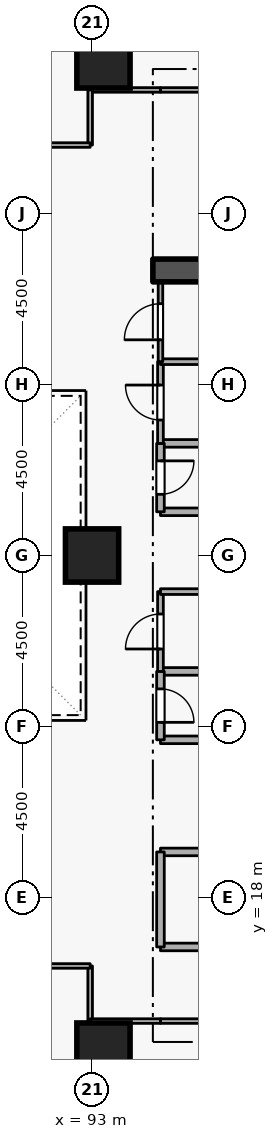
"""IFC4 building model, lengths in metres.
Left out: names, types, materials, properties, quantities, classifications, styles, units other than length and angle.
Written with IfcOpenShell. Run it as: python <this file> out.ifc"""

import sys

from ifc_helpers import new_model, si_unit, direction, frame, frame_2d, origin, origin_2d, place, context, subcontext, project, spatial, rectangle, extrude, element, fill, save


model = new_model("IFC4")
c1 = context("Model", 3, precision=1e-05, world=origin(), true_north=direction((0.0, 1.0)))
c2 = subcontext(c1, "Body", "Model", "MODEL_VIEW")
j1 = project(units=[si_unit("LENGTHUNIT", "METRE"), si_unit("PLANEANGLEUNIT", "RADIAN")], contexts=[c1])
p1 = place(None, origin())
s1 = spatial("IfcSite", under=j1, at=p1, CompositionType="ELEMENT")
p2 = place(p1, origin())
s2 = spatial("IfcBuilding", under=s1, at=p2, CompositionType="ELEMENT")
p3 = place(p2, frame((0.0, 0.0, 53.7)))
s3 = spatial("IfcBuildingStorey", under=s2, at=p3, CompositionType="ELEMENT", Elevation=53.7)
p4 = place(p3, frame((94.6, 34.5, 0.0), z_axis=(0.0, 0.0, 1.0), x_axis=(1.0, 0.0, 0.0)))
e1 = element("IfcWall", 1, at=p4, inside=s3, PredefinedType="SHEAR", context=c2, shape_type="SweptSolid", body=[
    extrude(rectangle(XDim=5.7, YDim=0.6, at=frame_2d((2.85, 0.0))), origin(), (0.0, 0.0, 1.0), 3.6),
])
for number, where, z_axis, x_axis in (
    (2, (93.3, 14.0, 0.0), (0.0, 0.0, 1.0), (1.0, 0.0, 0.0)),
    (3, (93.3, 40.0, 0.0), (0.0, 0.0, 1.0), (1.0, 0.0, 0.0)),
    (4, (93.0, 27.0, 0.0), (0.0, 0.0, 1.0), (1.0, 0.0, 0.0)),
):
    element("IfcColumn", number, at=place(p3, frame(where, z_axis=z_axis, x_axis=x_axis)), inside=s3, PredefinedType="COLUMN", context=c2, shape_type="SweptSolid", body=[
        extrude(rectangle(XDim=1.4, YDim=1.4, at=origin_2d()), origin(), (0.0, 0.0, 1.0), 3.6),
    ])
p5 = place(p3, frame((94.8, 16.7, 0.0), z_axis=(0.0, 0.0, 1.0), x_axis=(1.0, 0.0, 0.0)))
e5 = element("IfcWall", 5, at=p5, inside=s3, PredefinedType="STANDARD", context=c2, shape_type="SweptSolid", body=[
    extrude(rectangle(XDim=5.7, YDim=0.2, at=frame_2d((2.85, 0.0))), origin(), (0.0, 0.0, 1.0), 3.34),
])
p6 = place(p5, frame((2.275, 0.0, 0.0)))
e6 = element("IfcOpeningElement", 6, at=p6, cuts=e5, PredefinedType="OPENING", context=c2, shape_type="SweptSolid", body=[
    extrude(rectangle(XDim=1.15, YDim=2.1, at=frame_2d((0.575, 1.05))), frame((0.0, 0.11, 0.0), z_axis=(0.0, -1.0, 0.0), x_axis=(1.0, 0.0, 0.0)), (0.0, 0.0, 1.0), 0.22),
])
p7 = place(p3, frame((97.1, 19.2, 0.0), z_axis=(0.0, 0.0, 1.0), x_axis=(-1.0, 0.0, 0.0)))
e7 = element("IfcWall", 7, at=p7, inside=s3, PredefinedType="STANDARD", context=c2, shape_type="SweptSolid", body=[
    extrude(rectangle(XDim=2.3, YDim=0.2, at=frame_2d((1.15, 0.0))), origin(), (0.0, 0.0, 1.0), 2.545),
])
p8 = place(p3, frame((94.8, 19.2, 0.0), z_axis=(0.0, 0.0, 1.0), x_axis=(0.0, -1.0, 0.0)))
e8 = element("IfcWall", 8, at=p8, inside=s3, PredefinedType="STANDARD", context=c2, shape_type="SweptSolid", body=[
    extrude(rectangle(XDim=2.5, YDim=0.2, at=frame_2d((1.25, 0.0))), origin(), (0.0, 0.0, 1.0), 3.34),
])
for number, where, z_axis, x_axis in (
    (9, (94.8, 28.15, 0.0), (0.0, 0.0, 1.0), (1.0, 0.0, 0.0)),
    (10, (96.85, 29.95, 0.0), (0.0, 0.0, 1.0), (-1.0, 0.0, 0.0)),
):
    element("IfcWall", number, at=place(p3, frame(where, z_axis=z_axis, x_axis=x_axis)), inside=s3, PredefinedType="STANDARD", context=c2, shape_type="SweptSolid", body=[
        extrude(rectangle(XDim=2.05, YDim=0.2, at=frame_2d((1.025, 0.0))), origin(), (0.0, 0.0, 1.0), 3.34),
    ])
p9 = place(p3, frame((94.8, 29.95, 0.0), z_axis=(0.0, 0.0, 1.0), x_axis=(0.0, -1.0, 0.0)))
e11 = element("IfcWall", 11, at=p9, inside=s3, PredefinedType="STANDARD", context=c2, shape_type="SweptSolid", body=[
    extrude(rectangle(XDim=1.8, YDim=0.2, at=frame_2d((0.9, 0.0))), origin(), (0.0, 0.0, 1.0), 3.34),
])
p10 = place(p9, frame((0.46, 0.0, 0.0)))
e12 = element("IfcOpeningElement", 12, at=p10, cuts=e11, PredefinedType="OPENING", context=c2, shape_type="SweptSolid", body=[
    extrude(rectangle(XDim=0.88, YDim=2.04, at=frame_2d((0.44, 1.02))), frame((0.0, 0.11, 0.0), z_axis=(0.0, -1.0, 0.0), x_axis=(1.0, 0.0, 0.0)), (0.0, 0.0, 1.0), 0.22),
])
for number, where, z_axis, x_axis in (
    (13, (94.8, 22.15, 0.0), (0.0, 0.0, 1.0), (1.0, 0.0, 0.0)),
    (14, (96.85, 23.95, 0.0), (0.0, 0.0, 1.0), (-1.0, 0.0, 0.0)),
):
    element("IfcWall", number, at=place(p3, frame(where, z_axis=z_axis, x_axis=x_axis)), inside=s3, PredefinedType="STANDARD", context=c2, shape_type="SweptSolid", body=[
        extrude(rectangle(XDim=2.05, YDim=0.2, at=frame_2d((1.025, 0.0))), origin(), (0.0, 0.0, 1.0), 3.34),
    ])
p11 = place(p3, frame((94.8, 23.95, 0.0), z_axis=(0.0, 0.0, 1.0), x_axis=(0.0, -1.0, 0.0)))
e15 = element("IfcWall", 15, at=p11, inside=s3, PredefinedType="STANDARD", context=c2, shape_type="SweptSolid", body=[
    extrude(rectangle(XDim=1.8, YDim=0.2, at=frame_2d((0.9, 0.0))), origin(), (0.0, 0.0, 1.0), 3.34),
])
p12 = place(p11, frame((0.46, 0.0, 0.0)))
e16 = element("IfcOpeningElement", 16, at=p12, cuts=e15, PredefinedType="OPENING", context=c2, shape_type="SweptSolid", body=[
    extrude(rectangle(XDim=0.88, YDim=2.04, at=frame_2d((0.44, 1.02))), frame((0.0, 0.11, 0.0), z_axis=(0.0, -1.0, 0.0), x_axis=(1.0, 0.0, 0.0)), (0.0, 0.0, 1.0), 0.22),
])
p13 = place(p3, frame((94.8, 23.95, 0.0), z_axis=(0.0, 0.0, 1.0), x_axis=(0.0, 1.0, 0.0)))
e17 = element("IfcWall", 17, at=p13, inside=s3, PredefinedType="PARTITIONING", context=c2, shape_type="SweptSolid", body=[
    extrude(rectangle(XDim=2.1, YDim=0.15, at=frame_2d((1.05, 0.0))), origin(), (0.0, 0.0, 1.0), 3.34),
])
p14 = place(p13, frame((0.59, 0.0, 0.0)))
e18 = element("IfcOpeningElement", 18, at=p14, cuts=e17, PredefinedType="OPENING", context=c2, shape_type="SweptSolid", body=[
    extrude(rectangle(XDim=0.92, YDim=2.08, at=frame_2d((0.46, 1.04))), frame((0.0, 0.085, 0.0), z_axis=(0.0, -1.0, 0.0), x_axis=(1.0, 0.0, 0.0)), (0.0, 0.0, 1.0), 0.17),
])
p15 = place(p3, frame((94.8, 26.05, 0.0), z_axis=(0.0, 0.0, 1.0), x_axis=(1.0, 0.0, 0.0)))
e19 = element("IfcWall", 19, at=p15, inside=s3, PredefinedType="PARTITIONING", context=c2, shape_type="SweptSolid", body=[
    extrude(rectangle(XDim=2.05, YDim=0.15, at=frame_2d((1.025, 0.0))), origin(), (0.0, 0.0, 1.0), 3.34),
])
p16 = place(p3, frame((94.8, 29.95, 0.0), z_axis=(0.0, 0.0, 1.0), x_axis=(0.0, 1.0, 0.0)))
e20 = element("IfcWall", 20, at=p16, inside=s3, PredefinedType="PARTITIONING", context=c2, shape_type="SweptSolid", body=[
    extrude(rectangle(XDim=2.15, YDim=0.15, at=frame_2d((1.075, 0.0))), origin(), (0.0, 0.0, 1.0), 3.34),
])
p17 = place(p16, frame((0.615, 0.0, 0.0)))
e21 = element("IfcOpeningElement", 21, at=p17, cuts=e20, PredefinedType="OPENING", context=c2, shape_type="SweptSolid", body=[
    extrude(rectangle(XDim=0.92, YDim=2.08, at=frame_2d((0.46, 1.04))), frame((0.0, 0.085, 0.0), z_axis=(0.0, -1.0, 0.0), x_axis=(1.0, 0.0, 0.0)), (0.0, 0.0, 1.0), 0.17),
])
p18 = place(p3, frame((94.8, 32.1, 0.0), z_axis=(0.0, 0.0, 1.0), x_axis=(1.0, 0.0, 0.0)))
e22 = element("IfcWall", 22, at=p18, inside=s3, PredefinedType="PARTITIONING", context=c2, shape_type="SweptSolid", body=[
    extrude(rectangle(XDim=2.05, YDim=0.15, at=frame_2d((1.025, 0.0))), origin(), (0.0, 0.0, 1.0), 3.34),
])
p19 = place(p3, frame((94.8, 32.1, 0.0), z_axis=(0.0, 0.0, 1.0), x_axis=(0.0, 1.0, 0.0)))
e23 = element("IfcWall", 23, at=p19, inside=s3, PredefinedType="PARTITIONING", context=c2, shape_type="SweptSolid", body=[
    extrude(rectangle(XDim=2.1, YDim=0.12, at=frame_2d((1.05, 0.0))), origin(), (0.0, 0.0, 1.0), 3.34),
])
p20 = place(p19, frame((0.575, 0.0, 0.0)))
e24 = element("IfcOpeningElement", 24, at=p20, cuts=e23, PredefinedType="OPENING", context=c2, shape_type="SweptSolid", body=[
    extrude(rectangle(XDim=0.95, YDim=2.1, at=frame_2d((0.475, 1.05))), frame((0.0, 0.07, 0.0), z_axis=(0.0, -1.0, 0.0), x_axis=(1.0, 0.0, 0.0)), (0.0, 0.0, 1.0), 0.14),
])
p21 = place(p3, frame((92.95, 16.2, 0.0), z_axis=(0.0, 0.0, 1.0), x_axis=(0.0, -1.0, 0.0)))
e25 = element("IfcWall", 25, at=p21, inside=s3, PredefinedType="PARTITIONING", context=c2, shape_type="SweptSolid", body=[
    extrude(rectangle(XDim=1.45, YDim=0.12, at=frame_2d((0.725, 0.0))), origin(), (0.0, 0.0, 1.0), 3.34),
])
p22 = place(p3, frame((92.95, 14.75, 0.0), z_axis=(0.0, 0.0, 1.0), x_axis=(1.0, 0.0, 0.0)))
e26 = element("IfcWall", 26, at=p22, inside=s3, PredefinedType="PARTITIONING", context=c2, shape_type="SweptSolid", body=[
    extrude(rectangle(XDim=1.85, YDim=0.12, at=frame_2d((0.925, 0.0))), origin(), (0.0, 0.0, 1.0), 3.34),
])
p23 = place(p3, frame((94.8, 14.75, 0.0), z_axis=(0.0, 0.0, 1.0), x_axis=(1.0, 0.0, 0.0)))
e27 = element("IfcWall", 27, at=p23, inside=s3, PredefinedType="PARTITIONING", context=c2, shape_type="SweptSolid", body=[
    extrude(rectangle(XDim=9.35, YDim=0.12, at=frame_2d((4.675, 0.0))), origin(), (0.0, 0.0, 1.0), 3.34),
])
p24 = place(p23, frame((4.15, 0.0, 0.0)))
e28 = element("IfcOpeningElement", 28, at=p24, cuts=e27, PredefinedType="OPENING", context=c2, shape_type="SweptSolid", body=[
    extrude(rectangle(XDim=1.05, YDim=2.1, at=frame_2d((0.525, 1.05))), frame((0.0, 0.07, 0.0), z_axis=(0.0, -1.0, 0.0), x_axis=(1.0, 0.0, 0.0)), (0.0, 0.0, 1.0), 0.14),
])
p25 = place(p3, frame((88.5, 16.2, 0.0), z_axis=(0.0, 0.0, 1.0), x_axis=(1.0, 0.0, 0.0)))
e29 = element("IfcWall", 29, at=p25, inside=s3, PredefinedType="PARTITIONING", context=c2, shape_type="SweptSolid", body=[
    extrude(rectangle(XDim=4.45, YDim=0.12, at=frame_2d((2.225, 0.0))), origin(), (0.0, 0.0, 1.0), 3.34),
])
p26 = place(p3, frame((97.95, 39.25, 0.0), z_axis=(0.0, 0.0, 1.0), x_axis=(-1.0, 0.0, 0.0)))
e30 = element("IfcWall", 30, at=p26, inside=s3, PredefinedType="PARTITIONING", context=c2, shape_type="SweptSolid", body=[
    extrude(rectangle(XDim=3.15, YDim=0.12, at=frame_2d((1.575, 0.0))), origin(), (0.0, 0.0, 1.0), 3.34),
])
p27 = place(p3, frame((94.8, 39.25, 0.0), z_axis=(0.0, 0.0, 1.0), x_axis=(-1.0, 0.0, 0.0)))
e31 = element("IfcWall", 31, at=p27, inside=s3, PredefinedType="PARTITIONING", context=c2, shape_type="SweptSolid", body=[
    extrude(rectangle(XDim=1.85, YDim=0.12, at=frame_2d((0.925, 0.0))), origin(), (0.0, 0.0, 1.0), 3.34),
])
p28 = place(p3, frame((92.95, 39.25, 0.0), z_axis=(0.0, 0.0, 1.0), x_axis=(0.0, -1.0, 0.0)))
e32 = element("IfcWall", 32, at=p28, inside=s3, PredefinedType="PARTITIONING", context=c2, shape_type="SweptSolid", body=[
    extrude(rectangle(XDim=1.45, YDim=0.12, at=frame_2d((0.725, 0.0))), origin(), (0.0, 0.0, 1.0), 3.34),
])
p29 = place(p3, frame((92.95, 37.8, 0.0), z_axis=(0.0, 0.0, 1.0), x_axis=(-1.0, 0.0, 0.0)))
e33 = element("IfcWall", 33, at=p29, inside=s3, PredefinedType="PARTITIONING", context=c2, shape_type="SweptSolid", body=[
    extrude(rectangle(XDim=4.45, YDim=0.12, at=frame_2d((2.225, 0.0))), origin(), (0.0, 0.0, 1.0), 3.34),
])
p30 = place(p29, frame((1.7, 0.0, 0.0)))
e34 = element("IfcOpeningElement", 34, at=p30, cuts=e33, PredefinedType="OPENING", context=c2, shape_type="SweptSolid", body=[
    extrude(rectangle(XDim=1.05, YDim=2.1, at=frame_2d((0.525, 1.05))), frame((0.0, 0.07, 0.0), z_axis=(0.0, -1.0, 0.0), x_axis=(1.0, 0.0, 0.0)), (0.0, 0.0, 1.0), 0.14),
])
p31 = place(p10, origin())
e35 = element("IfcDoor", 35, at=p31, inside=s3, OperationType="SINGLE_SWING_LEFT", PredefinedType="DOOR", context=c2, shape_type="SweptSolid", body=[
    extrude(rectangle(XDim=0.88, YDim=2.04, at=frame_2d((0.44, 1.02))), frame((0.0, 0.025, 0.0), z_axis=(0.0, -1.0, 0.0), x_axis=(1.0, 0.0, 0.0)), (0.0, 0.0, 1.0), 0.05),
])
fill(e12, e35)
p32 = place(p12, origin())
e36 = element("IfcDoor", 36, at=p32, inside=s3, OperationType="SINGLE_SWING_RIGHT", PredefinedType="DOOR", context=c2, shape_type="SweptSolid", body=[
    extrude(rectangle(XDim=0.88, YDim=2.04, at=frame_2d((0.44, 1.02))), frame((0.0, 0.025, 0.0), z_axis=(0.0, -1.0, 0.0), x_axis=(1.0, 0.0, 0.0)), (0.0, 0.0, 1.0), 0.05),
])
fill(e16, e36)
p33 = place(p14, origin())
e37 = element("IfcDoor", 37, at=p33, inside=s3, OperationType="SINGLE_SWING_LEFT", PredefinedType="DOOR", context=c2, shape_type="SweptSolid", body=[
    extrude(rectangle(XDim=0.92, YDim=2.08, at=frame_2d((0.46, 1.04))), frame((0.0, 0.025, 0.0), z_axis=(0.0, -1.0, 0.0), x_axis=(1.0, 0.0, 0.0)), (0.0, 0.0, 1.0), 0.05),
])
fill(e18, e37)
p34 = place(p17, origin())
e38 = element("IfcDoor", 38, at=p34, inside=s3, OperationType="SINGLE_SWING_RIGHT", PredefinedType="DOOR", context=c2, shape_type="SweptSolid", body=[
    extrude(rectangle(XDim=0.92, YDim=2.08, at=frame_2d((0.46, 1.04))), frame((0.0, 0.025, 0.0), z_axis=(0.0, -1.0, 0.0), x_axis=(1.0, 0.0, 0.0)), (0.0, 0.0, 1.0), 0.05),
])
fill(e21, e38)
p35 = place(p20, origin())
e39 = element("IfcDoor", 39, at=p35, inside=s3, OperationType="SINGLE_SWING_LEFT", PredefinedType="DOOR", context=c2, shape_type="SweptSolid", body=[
    extrude(rectangle(XDim=0.95, YDim=2.1, at=frame_2d((0.475, 1.05))), frame((0.0, 0.025, 0.0), z_axis=(0.0, -1.0, 0.0), x_axis=(1.0, 0.0, 0.0)), (0.0, 0.0, 1.0), 0.05),
])
fill(e24, e39)
save(model, sys.argv[1])
